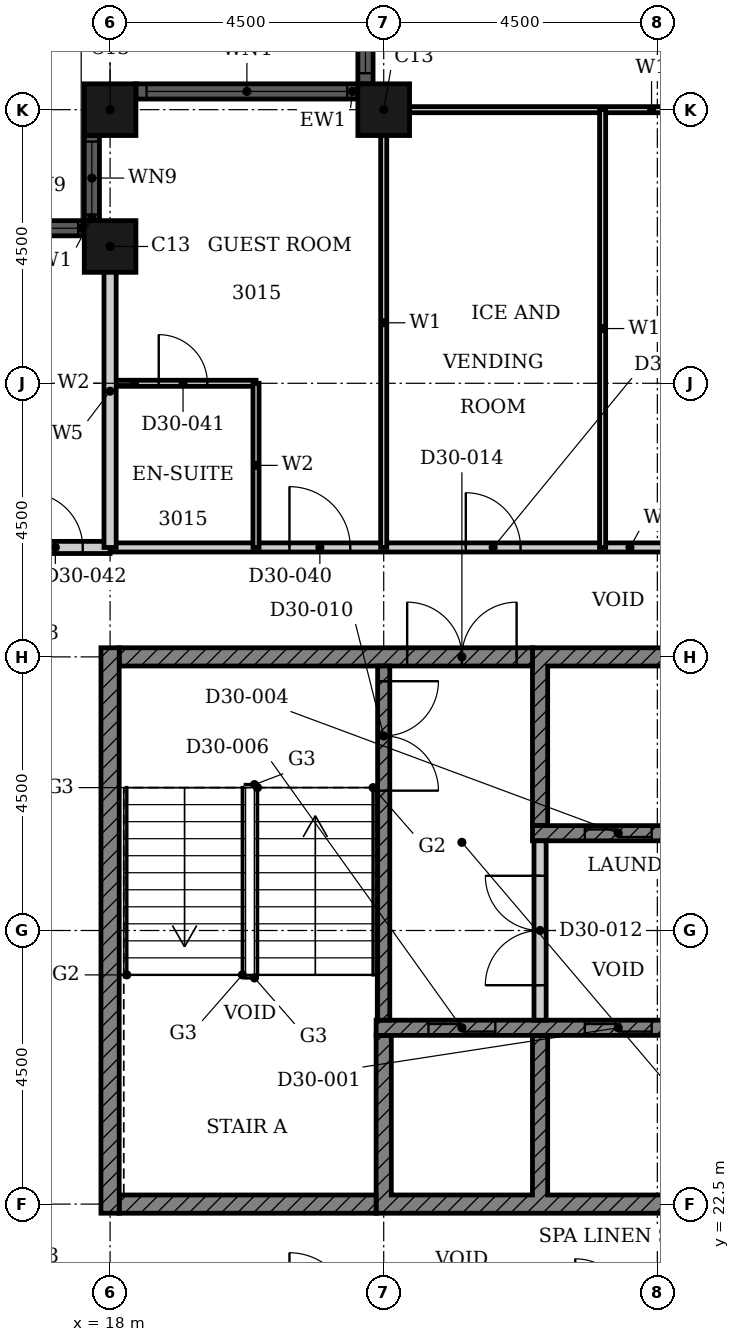
"""IFC4 building model, lengths in metres.
Left out: names, types, materials, properties, quantities, classifications, styles, units other than length and angle.
Written with IfcOpenShell. Run it as: python <this file> out.ifc"""

import sys

from ifc_helpers import new_model, si_unit, direction, frame, frame_2d, origin, origin_2d, place, context, subcontext, project, spatial, polyline, rectangle, hollow_rectangle, outline, extrude, element, fill, save


model = new_model("IFC4")
c1 = context("Model", 3, precision=1e-05, world=origin(), true_north=direction((0.0, 1.0)))
c2 = subcontext(c1, "Body", "Model", "MODEL_VIEW")
j1 = project(units=[si_unit("LENGTHUNIT", "METRE"), si_unit("PLANEANGLEUNIT", "RADIAN")], contexts=[c1])
p1 = place(None, origin())
s1 = spatial("IfcSite", under=j1, at=p1, CompositionType="ELEMENT")
p2 = place(p1, origin())
s2 = spatial("IfcBuilding", under=s1, at=p2, CompositionType="ELEMENT")
p3 = place(p2, frame((0.0, 0.0, 122.4)))
s3 = spatial("IfcBuildingStorey", under=s2, at=p3, CompositionType="ELEMENT", Elevation=122.4)
for number, where, z_axis, x_axis in (
    (1, (22.5, 40.5, 0.0), (0.0, 0.0, 1.0), (1.0, 0.0, 0.0)),
    (2, (18.0, 40.5, 0.0), (0.0, 0.0, 1.0), (1.0, 0.0, 0.0)),
    (3, (18.0, 38.25, 0.0), (0.0, 0.0, 1.0), (1.0, 0.0, 0.0)),
):
    element("IfcColumn", number, at=place(p3, frame(where, z_axis=z_axis, x_axis=x_axis)), inside=s3, PredefinedType="COLUMN", context=c2, shape_type="SweptSolid", body=[
        extrude(hollow_rectangle(XDim=0.85, YDim=0.85, WallThickness=0.026, at=origin_2d()), origin(), (0.0, 0.0, 1.0), 3.6),
    ])
p4 = place(p3, frame((22.2, 49.075, 0.0), z_axis=(0.0, 0.0, 1.0), x_axis=(0.0, -1.0, 0.0)))
e4 = element("IfcWall", 4, at=p4, inside=s3, PredefinedType="SOLIDWALL", context=c2, shape_type="SweptSolid", body=[
    extrude(rectangle(XDim=8.15, YDim=0.25, at=frame_2d((4.075, 0.0))), origin(), (0.0, 0.0, 1.0), 3.6),
])
p5 = place(p4, frame((0.175, 0.0, 0.9)))
e5 = element("IfcOpeningElement", 5, at=p5, cuts=e4, PredefinedType="OPENING", context=c2, shape_type="SweptSolid", body=[
    extrude(rectangle(XDim=3.3, YDim=2.08, at=frame_2d((1.65, 1.04))), frame((0.0, 0.135, 0.0), z_axis=(0.0, -1.0, 0.0), x_axis=(1.0, 0.0, 0.0)), (0.0, 0.0, 1.0), 0.27),
])
p6 = place(p4, frame((4.675, 0.0, 0.9)))
e6 = element("IfcOpeningElement", 6, at=p6, cuts=e4, PredefinedType="OPENING", context=c2, shape_type="SweptSolid", body=[
    extrude(rectangle(XDim=3.3, YDim=2.08, at=frame_2d((1.65, 1.04))), frame((0.0, 0.135, 0.0), z_axis=(0.0, -1.0, 0.0), x_axis=(1.0, 0.0, 0.0)), (0.0, 0.0, 1.0), 0.27),
])
p7 = place(p3, frame((22.075, 40.8, 0.0), z_axis=(0.0, 0.0, 1.0), x_axis=(-1.0, 0.0, 0.0)))
e7 = element("IfcWall", 7, at=p7, inside=s3, PredefinedType="SOLIDWALL", context=c2, shape_type="SweptSolid", body=[
    extrude(rectangle(XDim=3.65, YDim=0.25, at=frame_2d((1.825, 0.0))), origin(), (0.0, 0.0, 1.0), 3.6),
])
p8 = place(p7, frame((0.175, 0.0, 0.9)))
e8 = element("IfcOpeningElement", 8, at=p8, cuts=e7, PredefinedType="OPENING", context=c2, shape_type="SweptSolid", body=[
    extrude(rectangle(XDim=3.3, YDim=2.08, at=frame_2d((1.65, 1.04))), frame((0.0, 0.135, 0.0), z_axis=(0.0, -1.0, 0.0), x_axis=(1.0, 0.0, 0.0)), (0.0, 0.0, 1.0), 0.27),
])
p9 = place(p3, frame((17.7, 40.075, 0.0), z_axis=(0.0, 0.0, 1.0), x_axis=(0.0, -1.0, 0.0)))
e9 = element("IfcWall", 9, at=p9, inside=s3, PredefinedType="SOLIDWALL", context=c2, shape_type="SweptSolid", body=[
    extrude(rectangle(XDim=1.4, YDim=0.25, at=frame_2d((0.7, 0.0))), origin(), (0.0, 0.0, 1.0), 3.6),
])
p10 = place(p9, frame((0.1, 0.0, 0.9)))
e10 = element("IfcOpeningElement", 10, at=p10, cuts=e9, PredefinedType="OPENING", context=c2, shape_type="SweptSolid", body=[
    extrude(rectangle(XDim=1.2, YDim=2.08, at=frame_2d((0.6, 1.04))), frame((0.0, 0.135, 0.0), z_axis=(0.0, -1.0, 0.0), x_axis=(1.0, 0.0, 0.0)), (0.0, 0.0, 1.0), 0.27),
])
p11 = place(p3, frame((17.575, 38.55, 0.0), z_axis=(0.0, 0.0, 1.0), x_axis=(-1.0, 0.0, 0.0)))
e11 = element("IfcWall", 11, at=p11, inside=s3, PredefinedType="SOLIDWALL", context=c2, shape_type="SweptSolid", body=[
    extrude(rectangle(XDim=1.4, YDim=0.25, at=frame_2d((0.7, 0.0))), origin(), (0.0, 0.0, 1.0), 3.6),
])
p12 = place(p11, frame((0.1, 0.0, 0.9)))
e12 = element("IfcOpeningElement", 12, at=p12, cuts=e11, PredefinedType="OPENING", context=c2, shape_type="SweptSolid", body=[
    extrude(rectangle(XDim=1.2, YDim=2.08, at=frame_2d((0.6, 1.04))), frame((0.0, 0.135, 0.0), z_axis=(0.0, -1.0, 0.0), x_axis=(1.0, 0.0, 0.0)), (0.0, 0.0, 1.0), 0.27),
])
p13 = place(p3, origin())
e13 = element("IfcWall", 13, at=p13, inside=s3, PredefinedType="SHEAR", context=c2, shape_type="SweptSolid", body=[
    extrude(outline(polyline([(22.375, 22.35), (38.053, 22.35), (38.053, 25.275), (37.803, 25.275), (37.803, 22.65), (35.482, 22.65), (35.482, 25.275), (35.232, 25.275), (35.232, 22.65), (32.911, 22.65), (32.911, 25.275), (32.661, 25.275), (32.661, 22.65), (30.339, 22.65), (30.339, 25.275), (30.089, 25.275), (30.089, 22.65), (27.768, 22.65), (27.768, 25.275), (27.518, 25.275), (27.518, 22.65), (25.197, 22.65), (25.197, 25.275), (24.947, 25.275), (24.947, 22.65), (22.625, 22.65), (22.625, 25.275), (22.375, 25.275), (22.375, 22.35)])), origin(), (0.0, 0.0, 1.0), 3.3),
])
p14 = place(p3, origin())
e14 = element("IfcWall", 14, at=p14, inside=s3, PredefinedType="SHEAR", context=c2, shape_type="SweptSolid", body=[
    extrude(outline(polyline([(24.947, 28.725), (25.197, 28.725), (25.197, 31.35), (27.518, 31.35), (27.518, 28.725), (27.768, 28.725), (27.768, 31.35), (30.089, 31.35), (30.089, 28.725), (30.339, 28.725), (30.339, 31.35), (32.661, 31.35), (32.661, 28.725), (32.911, 28.725), (32.911, 31.35), (35.232, 31.35), (35.232, 28.725), (35.482, 28.725), (35.482, 31.35), (37.803, 31.35), (37.803, 28.725), (38.053, 28.725), (38.053, 31.35), (40.375, 31.35), (40.375, 28.725), (40.625, 28.725), (40.625, 31.65), (24.947, 31.65), (24.947, 28.725)])), origin(), (0.0, 0.0, 1.0), 3.3),
])
p15 = place(p3, frame((18.15, 22.5, 0.0), z_axis=(0.0, 0.0, 1.0), x_axis=(1.0, 0.0, 0.0)))
e15 = element("IfcWall", 15, at=p15, inside=s3, PredefinedType="SHEAR", context=c2, shape_type="SweptSolid", body=[
    extrude(rectangle(XDim=4.225, YDim=0.3, at=frame_2d((2.113, 0.0))), origin(), (0.0, 0.0, 1.0), 3.3),
])
p16 = place(p3, frame((18.15, 31.5, 0.0), z_axis=(0.0, 0.0, 1.0), x_axis=(1.0, 0.0, 0.0)))
e16 = element("IfcWall", 16, at=p16, inside=s3, PredefinedType="SHEAR", context=c2, shape_type="SweptSolid", body=[
    extrude(rectangle(XDim=6.797, YDim=0.3, at=frame_2d((3.398, 0.0))), origin(), (0.0, 0.0, 1.0), 3.3),
])
p17 = place(p16, frame((4.736, 0.0, 0.0)))
e17 = element("IfcOpeningElement", 17, at=p17, cuts=e16, PredefinedType="OPENING", context=c2, shape_type="SweptSolid", body=[
    extrude(rectangle(XDim=1.8, YDim=2.1, at=frame_2d((0.9, 1.05))), frame((0.0, 0.16, 0.0), z_axis=(0.0, -1.0, 0.0), x_axis=(1.0, 0.0, 0.0)), (0.0, 0.0, 1.0), 0.32),
])
p18 = place(p3, frame((18.0, 22.35, 0.0), z_axis=(0.0, 0.0, 1.0), x_axis=(0.0, 1.0, 0.0)))
e18 = element("IfcWall", 18, at=p18, inside=s3, PredefinedType="SHEAR", context=c2, shape_type="SweptSolid", body=[
    extrude(rectangle(XDim=9.3, YDim=0.3, at=frame_2d((4.65, 0.0))), origin(), (0.0, 0.0, 1.0), 3.3),
])
p19 = place(p3, frame((22.375, 25.4, 0.0), z_axis=(0.0, 0.0, 1.0), x_axis=(1.0, 0.0, 0.0)))
e19 = element("IfcWall", 19, at=p19, inside=s3, PredefinedType="SHEAR", context=c2, shape_type="SweptSolid", body=[
    extrude(rectangle(XDim=15.678, YDim=0.25, at=frame_2d((7.839, 0.0))), origin(), (0.0, 0.0, 1.0), 3.3),
])
p20 = place(p19, frame((3.432, 0.0, 0.0)))
e20 = element("IfcOpeningElement", 20, at=p20, cuts=e19, PredefinedType="OPENING", context=c2, shape_type="SweptSolid", body=[
    extrude(rectangle(XDim=1.1, YDim=2.1, at=frame_2d((0.55, 1.05))), frame((0.0, 0.135, 0.0), z_axis=(0.0, -1.0, 0.0), x_axis=(1.0, 0.0, 0.0)), (0.0, 0.0, 1.0), 0.27),
])
p21 = place(p19, frame((11.146, 0.0, 0.0)))
e21 = element("IfcOpeningElement", 21, at=p21, cuts=e19, PredefinedType="OPENING", context=c2, shape_type="SweptSolid", body=[
    extrude(rectangle(XDim=1.1, YDim=2.1, at=frame_2d((0.55, 1.05))), frame((0.0, 0.135, 0.0), z_axis=(0.0, -1.0, 0.0), x_axis=(1.0, 0.0, 0.0)), (0.0, 0.0, 1.0), 0.27),
])
p22 = place(p19, frame((13.718, 0.0, 0.0)))
e22 = element("IfcOpeningElement", 22, at=p22, cuts=e19, PredefinedType="OPENING", context=c2, shape_type="SweptSolid", body=[
    extrude(rectangle(XDim=1.1, YDim=2.1, at=frame_2d((0.55, 1.05))), frame((0.0, 0.135, 0.0), z_axis=(0.0, -1.0, 0.0), x_axis=(1.0, 0.0, 0.0)), (0.0, 0.0, 1.0), 0.27),
])
p23 = place(p19, frame((0.861, 0.0, 0.0)))
e23 = element("IfcOpeningElement", 23, at=p23, cuts=e19, PredefinedType="OPENING", context=c2, shape_type="SweptSolid", body=[
    extrude(rectangle(XDim=1.1, YDim=2.1, at=frame_2d((0.55, 1.05))), frame((0.0, 0.135, 0.0), z_axis=(0.0, -1.0, 0.0), x_axis=(1.0, 0.0, 0.0)), (0.0, 0.0, 1.0), 0.27),
])
p24 = place(p3, frame((24.947, 28.6, 0.0), z_axis=(0.0, 0.0, 1.0), x_axis=(1.0, 0.0, 0.0)))
e24 = element("IfcWall", 24, at=p24, inside=s3, PredefinedType="SHEAR", context=c2, shape_type="SweptSolid", body=[
    extrude(rectangle(XDim=15.678, YDim=0.25, at=frame_2d((7.839, 0.0))), origin(), (0.0, 0.0, 1.0), 3.3),
])
p25 = place(p24, frame((0.861, 0.0, 0.0)))
e25 = element("IfcOpeningElement", 25, at=p25, cuts=e24, PredefinedType="OPENING", context=c2, shape_type="SweptSolid", body=[
    extrude(rectangle(XDim=1.1, YDim=2.1, at=frame_2d((0.55, 1.05))), frame((0.0, 0.135, 0.0), z_axis=(0.0, -1.0, 0.0), x_axis=(1.0, 0.0, 0.0)), (0.0, 0.0, 1.0), 0.27),
])
p26 = place(p24, frame((8.575, 0.0, 0.0)))
e26 = element("IfcOpeningElement", 26, at=p26, cuts=e24, PredefinedType="OPENING", context=c2, shape_type="SweptSolid", body=[
    extrude(rectangle(XDim=1.1, YDim=2.1, at=frame_2d((0.55, 1.05))), frame((0.0, 0.135, 0.0), z_axis=(0.0, -1.0, 0.0), x_axis=(1.0, 0.0, 0.0)), (0.0, 0.0, 1.0), 0.27),
])
p27 = place(p24, frame((13.718, 0.0, 0.0)))
e27 = element("IfcOpeningElement", 27, at=p27, cuts=e24, PredefinedType="OPENING", context=c2, shape_type="SweptSolid", body=[
    extrude(rectangle(XDim=1.1, YDim=2.1, at=frame_2d((0.55, 1.05))), frame((0.0, 0.135, 0.0), z_axis=(0.0, -1.0, 0.0), x_axis=(1.0, 0.0, 0.0)), (0.0, 0.0, 1.0), 0.27),
])
p28 = place(p3, frame((22.5, 31.35, 0.0), z_axis=(0.0, 0.0, 1.0), x_axis=(0.0, -1.0, 0.0)))
e28 = element("IfcWall", 28, at=p28, inside=s3, PredefinedType="SHEAR", context=c2, shape_type="SweptSolid", body=[
    extrude(rectangle(XDim=5.825, YDim=0.2, at=frame_2d((2.913, 0.0))), origin(), (0.0, 0.0, 1.0), 3.3),
])
p29 = place(p28, frame((0.25, 0.0, 0.0)))
e29 = element("IfcOpeningElement", 29, at=p29, cuts=e28, PredefinedType="OPENING", context=c2, shape_type="SweptSolid", body=[
    extrude(rectangle(XDim=1.8, YDim=2.1, at=frame_2d((0.9, 1.05))), frame((0.0, 0.11, 0.0), z_axis=(0.0, -1.0, 0.0), x_axis=(1.0, 0.0, 0.0)), (0.0, 0.0, 1.0), 0.22),
])
p30 = place(p3, frame((25.072, 25.525, 0.0), z_axis=(0.0, 0.0, 1.0), x_axis=(0.0, 1.0, 0.0)))
e30 = element("IfcWall", 30, at=p30, inside=s3, PredefinedType="PARTITIONING", context=c2, shape_type="SweptSolid", body=[
    extrude(rectangle(XDim=2.95, YDim=0.2, at=frame_2d((1.475, 0.0))), origin(), (0.0, 0.0, 1.0), 3.3),
])
p31 = place(p30, frame((0.575, 0.0, 0.0)))
e31 = element("IfcOpeningElement", 31, at=p31, cuts=e30, PredefinedType="OPENING", context=c2, shape_type="SweptSolid", body=[
    extrude(rectangle(XDim=1.8, YDim=2.1, at=frame_2d((0.9, 1.05))), frame((0.0, 0.11, 0.0), z_axis=(0.0, -1.0, 0.0), x_axis=(1.0, 0.0, 0.0)), (0.0, 0.0, 1.0), 0.22),
])
p32 = place(p3, frame((18.0, 33.3, 0.0), z_axis=(0.0, 0.0, 1.0), x_axis=(1.0, 0.0, 0.0)))
e32 = element("IfcWall", 32, at=p32, inside=s3, PredefinedType="PARTITIONING", context=c2, shape_type="SweptSolid", body=[
    extrude(rectangle(XDim=13.5, YDim=0.15, at=frame_2d((6.75, 0.0))), origin(), (0.0, 0.0, 1.0), 3.3),
])
p33 = place(p32, frame((2.95, 0.0, 0.0)))
e33 = element("IfcOpeningElement", 33, at=p33, cuts=e32, PredefinedType="OPENING", context=c2, shape_type="SweptSolid", body=[
    extrude(rectangle(XDim=1.0, YDim=2.1, at=frame_2d((0.5, 1.05))), frame((0.0, 0.085, 0.0), z_axis=(0.0, -1.0, 0.0), x_axis=(1.0, 0.0, 0.0)), (0.0, 0.0, 1.0), 0.17),
])
p34 = place(p32, frame((5.85, 0.0, 0.0)))
e34 = element("IfcOpeningElement", 34, at=p34, cuts=e32, PredefinedType="OPENING", context=c2, shape_type="SweptSolid", body=[
    extrude(rectangle(XDim=0.9, YDim=2.1, at=frame_2d((0.45, 1.05))), frame((0.0, 0.085, 0.0), z_axis=(0.0, -1.0, 0.0), x_axis=(1.0, 0.0, 0.0)), (0.0, 0.0, 1.0), 0.17),
])
p35 = place(p32, frame((10.35, 0.0, 0.0)))
e35 = element("IfcOpeningElement", 35, at=p35, cuts=e32, PredefinedType="OPENING", context=c2, shape_type="SweptSolid", body=[
    extrude(rectangle(XDim=0.9, YDim=2.1, at=frame_2d((0.45, 1.05))), frame((0.0, 0.085, 0.0), z_axis=(0.0, -1.0, 0.0), x_axis=(1.0, 0.0, 0.0)), (0.0, 0.0, 1.0), 0.17),
])
p36 = place(p3, frame((22.31, 40.5, 0.0), z_axis=(0.0, 0.0, 1.0), x_axis=(1.0, 0.0, 0.0)))
e36 = element("IfcWall", 36, at=p36, inside=s3, PredefinedType="PARTITIONING", context=c2, shape_type="SweptSolid", body=[
    extrude(rectangle(XDim=9.19, YDim=0.1, at=frame_2d((4.595, 0.0))), origin(), (0.0, 0.0, 1.0), 2.38),
])
p37 = place(p3, frame((22.5, 33.3, 0.0), z_axis=(0.0, 0.0, 1.0), x_axis=(0.0, 1.0, 0.0)))
e37 = element("IfcWall", 37, at=p37, inside=s3, PredefinedType="PARTITIONING", context=c2, shape_type="SweptSolid", body=[
    extrude(rectangle(XDim=7.39, YDim=0.1, at=frame_2d((3.695, 0.0))), origin(), (0.0, 0.0, 1.0), 3.3),
])
p38 = place(p3, frame((26.1, 33.3, 0.0), z_axis=(0.0, 0.0, 1.0), x_axis=(0.0, 1.0, 0.0)))
e38 = element("IfcWall", 38, at=p38, inside=s3, PredefinedType="PARTITIONING", context=c2, shape_type="SweptSolid", body=[
    extrude(rectangle(XDim=7.2, YDim=0.1, at=frame_2d((3.6, 0.0))), origin(), (0.0, 0.0, 1.0), 3.3),
])
p39 = place(p3, frame((18.0, 36.0, 0.0), z_axis=(0.0, 0.0, 1.0), x_axis=(1.0, 0.0, 0.0)))
e39 = element("IfcWall", 39, at=p39, inside=s3, PredefinedType="PARTITIONING", context=c2, shape_type="SweptSolid", body=[
    extrude(rectangle(XDim=2.4, YDim=0.1, at=frame_2d((1.2, 0.0))), origin(), (0.0, 0.0, 1.0), 3.3),
])
p40 = place(p39, frame((0.8, 0.0, 0.0)))
e40 = element("IfcOpeningElement", 40, at=p40, cuts=e39, PredefinedType="OPENING", context=c2, shape_type="SweptSolid", body=[
    extrude(rectangle(XDim=0.8, YDim=2.1, at=frame_2d((0.4, 1.05))), frame((0.0, 0.06, 0.0), z_axis=(0.0, -1.0, 0.0), x_axis=(1.0, 0.0, 0.0)), (0.0, 0.0, 1.0), 0.12),
])
p41 = place(p3, frame((20.4, 33.3, 0.0), z_axis=(0.0, 0.0, 1.0), x_axis=(0.0, 1.0, 0.0)))
e41 = element("IfcWall", 41, at=p41, inside=s3, PredefinedType="PARTITIONING", context=c2, shape_type="SweptSolid", body=[
    extrude(rectangle(XDim=2.7, YDim=0.1, at=frame_2d((1.35, 0.0))), origin(), (0.0, 0.0, 1.0), 3.3),
])
p42 = place(p3, frame((13.5, 33.3, 0.0), z_axis=(0.0, 0.0, 1.0), x_axis=(1.0, 0.0, 0.0)))
e42 = element("IfcWall", 42, at=p42, inside=s3, PredefinedType="PARTITIONING", context=c2, shape_type="SweptSolid", body=[
    extrude(rectangle(XDim=4.5, YDim=0.2, at=frame_2d((2.25, 0.0))), origin(), (0.0, 0.0, 1.0), 3.3),
])
p43 = place(p42, frame((3.15, 0.0, 0.0)))
e43 = element("IfcOpeningElement", 43, at=p43, cuts=e42, PredefinedType="OPENING", context=c2, shape_type="SweptSolid", body=[
    extrude(rectangle(XDim=0.9, YDim=2.1, at=frame_2d((0.45, 1.05))), frame((0.0, 0.11, 0.0), z_axis=(0.0, -1.0, 0.0), x_axis=(1.0, 0.0, 0.0)), (0.0, 0.0, 1.0), 0.22),
])
p44 = place(p3, frame((18.0, 33.3, 0.0), z_axis=(0.0, 0.0, 1.0), x_axis=(0.0, 1.0, 0.0)))
e44 = element("IfcWall", 44, at=p44, inside=s3, PredefinedType="PARTITIONING", context=c2, shape_type="SweptSolid", body=[
    extrude(rectangle(XDim=5.14, YDim=0.2, at=frame_2d((2.57, 0.0))), origin(), (0.0, 0.0, 1.0), 3.3),
])
p45 = place(p6, origin())
e45 = element("IfcWindow", 45, at=p45, inside=s3, PartitioningType="SINGLE_PANEL", PredefinedType="WINDOW", context=c2, shape_type="SweptSolid", body=[
    extrude(rectangle(XDim=3.3, YDim=2.08, at=frame_2d((1.65, 1.04))), frame((0.0, 0.03, 0.0), z_axis=(0.0, -1.0, 0.0), x_axis=(1.0, 0.0, 0.0)), (0.0, 0.0, 1.0), 0.06),
])
fill(e6, e45)
p46 = place(p8, origin())
e46 = element("IfcWindow", 46, at=p46, inside=s3, PartitioningType="SINGLE_PANEL", PredefinedType="WINDOW", context=c2, shape_type="SweptSolid", body=[
    extrude(rectangle(XDim=3.3, YDim=2.08, at=frame_2d((1.65, 1.04))), frame((0.0, 0.03, 0.0), z_axis=(0.0, -1.0, 0.0), x_axis=(1.0, 0.0, 0.0)), (0.0, 0.0, 1.0), 0.06),
])
fill(e8, e46)
p47 = place(p10, origin())
e47 = element("IfcWindow", 47, at=p47, inside=s3, PartitioningType="SINGLE_PANEL", PredefinedType="WINDOW", context=c2, shape_type="SweptSolid", body=[
    extrude(rectangle(XDim=1.2, YDim=2.08, at=frame_2d((0.6, 1.04))), frame((0.0, 0.03, 0.0), z_axis=(0.0, -1.0, 0.0), x_axis=(1.0, 0.0, 0.0)), (0.0, 0.0, 1.0), 0.06),
])
fill(e10, e47)
p48 = place(p12, origin())
e48 = element("IfcWindow", 48, at=p48, inside=s3, PartitioningType="SINGLE_PANEL", PredefinedType="WINDOW", context=c2, shape_type="SweptSolid", body=[
    extrude(rectangle(XDim=1.2, YDim=2.08, at=frame_2d((0.6, 1.04))), frame((0.0, 0.03, 0.0), z_axis=(0.0, -1.0, 0.0), x_axis=(1.0, 0.0, 0.0)), (0.0, 0.0, 1.0), 0.06),
])
fill(e12, e48)
p49 = place(p20, origin())
e49 = element("IfcDoor", 49, at=p49, inside=s3, OperationType="DOUBLE_DOOR_SLIDING", PredefinedType="DOOR", context=c2, shape_type="SweptSolid", body=[
    extrude(rectangle(XDim=1.1, YDim=2.1, at=frame_2d((0.55, 1.05))), frame((0.0, 0.025, 0.0), z_axis=(0.0, -1.0, 0.0), x_axis=(1.0, 0.0, 0.0)), (0.0, 0.0, 1.0), 0.05),
])
fill(e20, e49)
p50 = place(p25, origin())
e50 = element("IfcDoor", 50, at=p50, inside=s3, OperationType="DOUBLE_DOOR_SLIDING", PredefinedType="DOOR", context=c2, shape_type="SweptSolid", body=[
    extrude(rectangle(XDim=1.1, YDim=2.1, at=frame_2d((0.55, 1.05))), frame((0.0, 0.025, 0.0), z_axis=(0.0, -1.0, 0.0), x_axis=(1.0, 0.0, 0.0)), (0.0, 0.0, 1.0), 0.05),
])
fill(e25, e50)
p51 = place(p23, origin())
e51 = element("IfcDoor", 51, at=p51, inside=s3, OperationType="DOUBLE_DOOR_SLIDING", PredefinedType="DOOR", context=c2, shape_type="SweptSolid", body=[
    extrude(rectangle(XDim=1.1, YDim=2.1, at=frame_2d((0.55, 1.05))), frame((0.0, 0.025, 0.0), z_axis=(0.0, -1.0, 0.0), x_axis=(1.0, 0.0, 0.0)), (0.0, 0.0, 1.0), 0.05),
])
fill(e23, e51)
p52 = place(p29, origin())
e52 = element("IfcDoor", 52, at=p52, inside=s3, OperationType="DOUBLE_DOOR_SINGLE_SWING", PredefinedType="DOOR", context=c2, shape_type="SweptSolid", body=[
    extrude(rectangle(XDim=1.8, YDim=2.1, at=frame_2d((0.9, 1.05))), frame((0.0, 0.025, 0.0), z_axis=(0.0, -1.0, 0.0), x_axis=(1.0, 0.0, 0.0)), (0.0, 0.0, 1.0), 0.05),
])
fill(e29, e52)
p53 = place(p31, origin())
e53 = element("IfcDoor", 53, at=p53, inside=s3, OperationType="DOUBLE_DOOR_SINGLE_SWING", PredefinedType="DOOR", context=c2, shape_type="SweptSolid", body=[
    extrude(rectangle(XDim=1.8, YDim=2.1, at=frame_2d((0.9, 1.05))), frame((0.0, 0.025, 0.0), z_axis=(0.0, -1.0, 0.0), x_axis=(1.0, 0.0, 0.0)), (0.0, 0.0, 1.0), 0.05),
])
fill(e31, e53)
p54 = place(p17, origin())
e54 = element("IfcDoor", 54, at=p54, inside=s3, OperationType="DOUBLE_DOOR_SINGLE_SWING", PredefinedType="DOOR", context=c2, shape_type="SweptSolid", body=[
    extrude(rectangle(XDim=1.8, YDim=2.1, at=frame_2d((0.9, 1.05))), frame((0.0, 0.025, 0.0), z_axis=(0.0, -1.0, 0.0), x_axis=(1.0, 0.0, 0.0)), (0.0, 0.0, 1.0), 0.05),
])
fill(e17, e54)
p55 = place(p33, origin())
e55 = element("IfcDoor", 55, at=p55, inside=s3, OperationType="SINGLE_SWING_RIGHT", PredefinedType="DOOR", context=c2, shape_type="SweptSolid", body=[
    extrude(rectangle(XDim=1.0, YDim=2.1, at=frame_2d((0.5, 1.05))), frame((0.0, 0.025, 0.0), z_axis=(0.0, -1.0, 0.0), x_axis=(1.0, 0.0, 0.0)), (0.0, 0.0, 1.0), 0.05),
])
fill(e33, e55)
p56 = place(p40, origin())
e56 = element("IfcDoor", 56, at=p56, inside=s3, OperationType="SINGLE_SWING_LEFT", PredefinedType="DOOR", context=c2, shape_type="SweptSolid", body=[
    extrude(rectangle(XDim=0.8, YDim=2.1, at=frame_2d((0.4, 1.05))), frame((0.0, 0.025, 0.0), z_axis=(0.0, -1.0, 0.0), x_axis=(1.0, 0.0, 0.0)), (0.0, 0.0, 1.0), 0.05),
])
fill(e40, e56)
p57 = place(p43, origin())
e57 = element("IfcDoor", 57, at=p57, inside=s3, OperationType="SINGLE_SWING_LEFT", PredefinedType="DOOR", context=c2, shape_type="SweptSolid", body=[
    extrude(rectangle(XDim=0.9, YDim=2.1, at=frame_2d((0.45, 1.05))), frame((0.0, 0.025, 0.0), z_axis=(0.0, -1.0, 0.0), x_axis=(1.0, 0.0, 0.0)), (0.0, 0.0, 1.0), 0.05),
])
fill(e43, e57)
p58 = place(p34, origin())
e58 = element("IfcDoor", 58, at=p58, inside=s3, OperationType="SINGLE_SWING_RIGHT", PredefinedType="DOOR", context=c2, shape_type="SweptSolid", body=[
    extrude(rectangle(XDim=0.9, YDim=2.1, at=frame_2d((0.45, 1.05))), frame((0.0, 0.025, 0.0), z_axis=(0.0, -1.0, 0.0), x_axis=(1.0, 0.0, 0.0)), (0.0, 0.0, 1.0), 0.05),
])
fill(e34, e58)
save(model, sys.argv[1])
